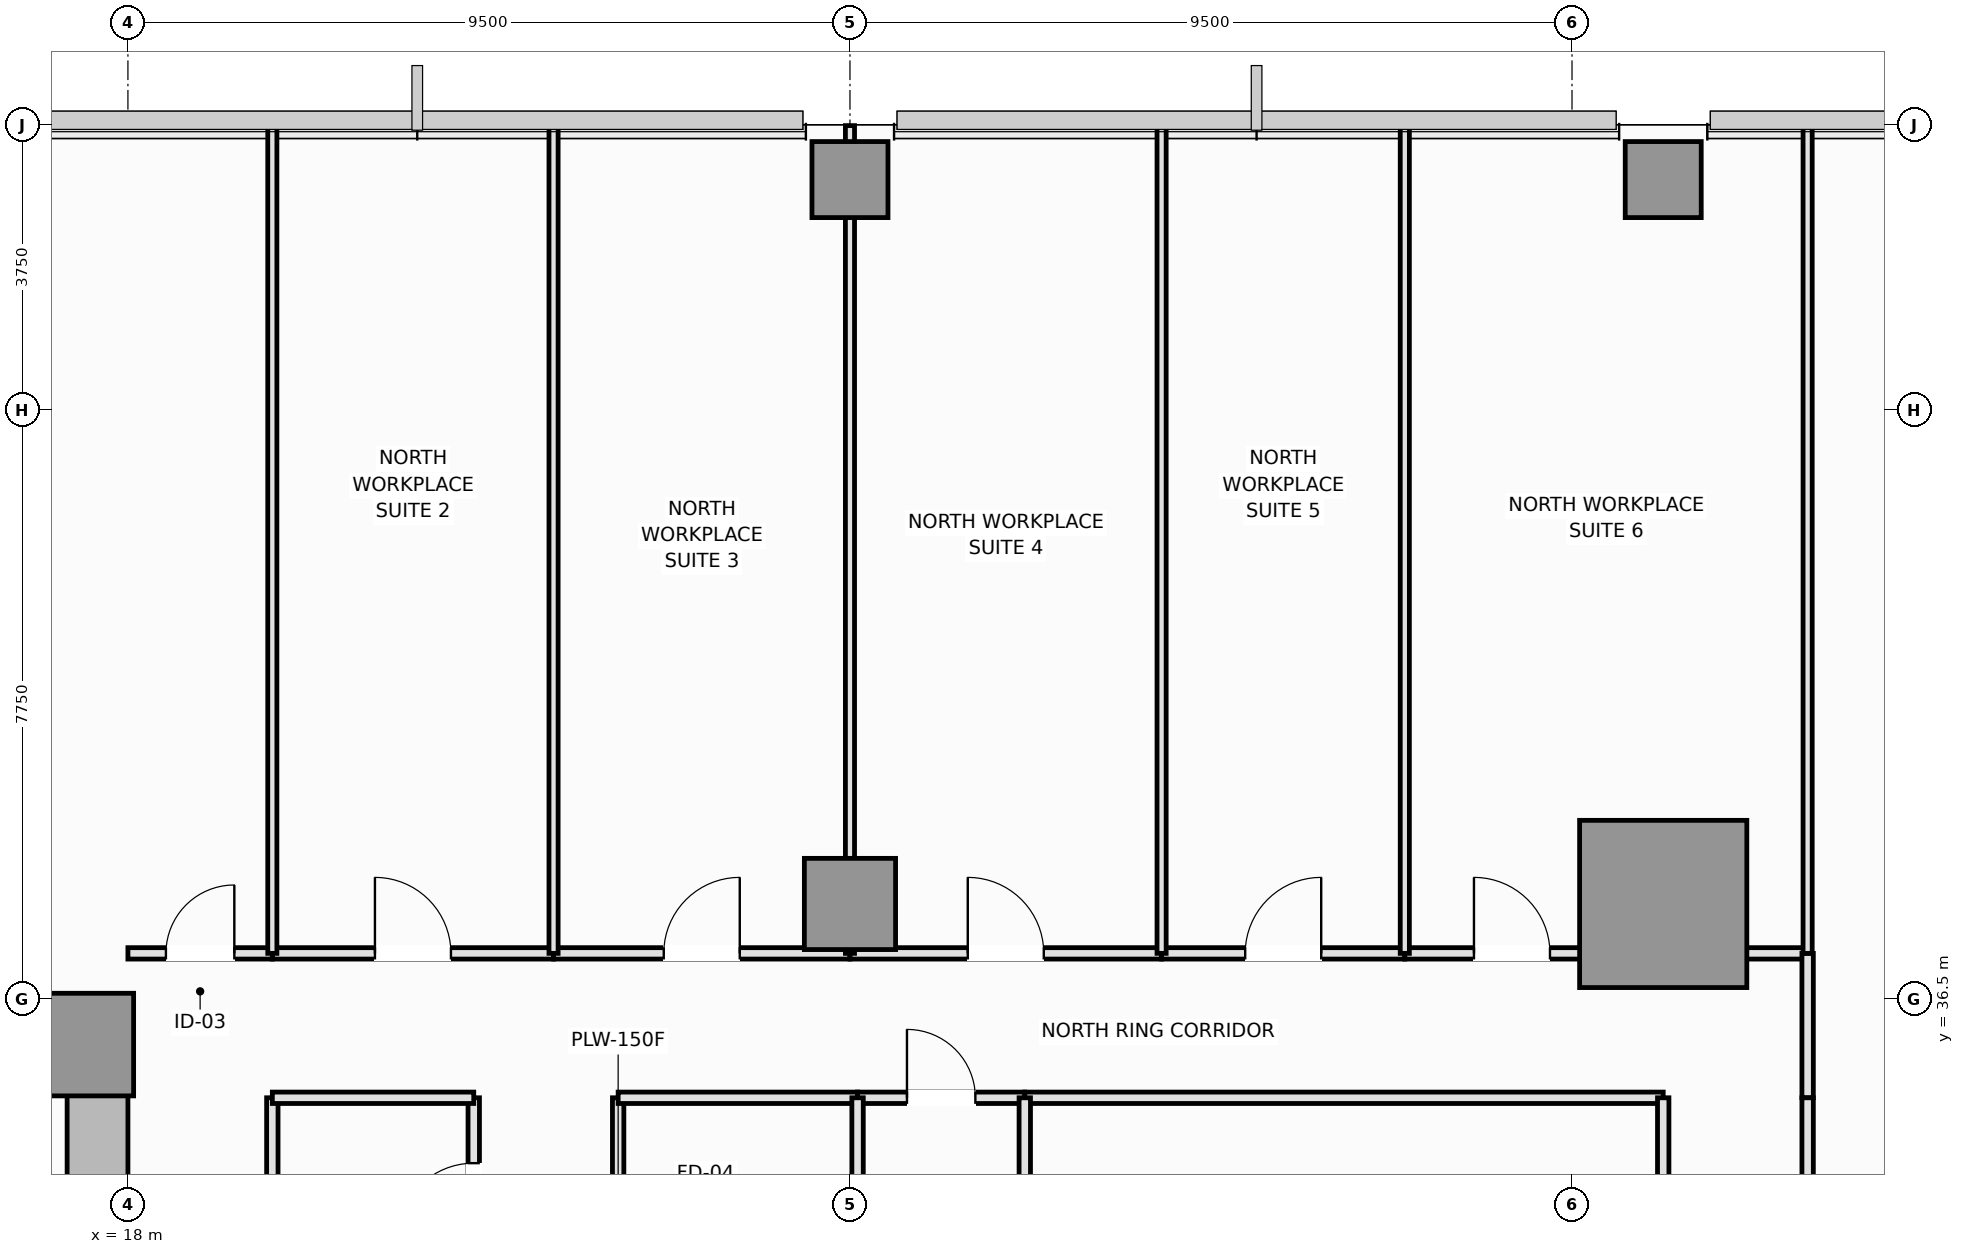
"""IFC4 building model, lengths in metres.
Left out: names, types, materials, properties, quantities, classifications, styles, units other than length and angle.
Written with IfcOpenShell. Run it as: python <this file> out.ifc"""

import sys

from ifc_helpers import new_model, si_unit, direction, frame, frame_2d, origin, origin_2d, place, context, subcontext, project, spatial, rectangle, extrude, element, fill, save


model = new_model("IFC4")
c1 = context("Model", 3, precision=1e-05, world=origin(), true_north=direction((0.0, 1.0)))
c2 = subcontext(c1, "Body", "Model", "MODEL_VIEW")
j1 = project(units=[si_unit("LENGTHUNIT", "METRE"), si_unit("PLANEANGLEUNIT", "RADIAN")], contexts=[c1])
p1 = place(None, origin())
s1 = spatial("IfcSite", under=j1, at=p1, CompositionType="ELEMENT")
p2 = place(p1, origin())
s2 = spatial("IfcBuilding", under=s1, at=p2, CompositionType="ELEMENT")
p3 = place(p2, frame((0.0, 0.0, 46.9)))
s3 = spatial("IfcBuildingStorey", under=s2, at=p3, CompositionType="ELEMENT", Elevation=46.9)
p4 = place(p3, frame((4.5, 36.1, 0.0), z_axis=(0.0, 0.0, 1.0), x_axis=(1.0, 0.0, 0.0)))
e1 = element("IfcWall", 1, at=p4, inside=s3, PredefinedType="SHEAR", context=c2, shape_type="SweptSolid", body=[
    extrude(rectangle(XDim=13.5, YDim=0.8, at=frame_2d((6.75, 0.0))), origin(), (0.0, 0.0, 1.0), 3.55),
])
p5 = place(p3, frame((17.6, 27.05, 0.0), z_axis=(0.0, 0.0, 1.0), x_axis=(0.0, 1.0, 0.0)))
e2 = element("IfcWall", 2, at=p5, inside=s3, PredefinedType="SHEAR", context=c2, shape_type="SweptSolid", body=[
    extrude(rectangle(XDim=8.65, YDim=0.8, at=frame_2d((4.325, 0.0))), origin(), (0.0, 0.0, 1.0), 3.55),
])
p6 = place(p5, frame((3.45, 0.0, 0.0)))
e3 = element("IfcOpeningElement", 3, at=p6, cuts=e2, PredefinedType="OPENING", context=c2, shape_type="SweptSolid", body=[
    extrude(rectangle(XDim=1.1, YDim=2.15, at=frame_2d((0.55, 1.075))), frame((0.0, 0.41, 0.0), z_axis=(0.0, -1.0, 0.0), x_axis=(1.0, 0.0, 0.0)), (0.0, 0.0, 1.0), 0.82),
])
p7 = place(p3, frame((17.4, 35.9, 0.0), z_axis=(0.0, 0.0, 1.0), x_axis=(1.0, 0.0, 0.0)))
e4 = element("IfcColumn", 4, at=p7, inside=s3, PredefinedType="PILASTER", context=c2, shape_type="SweptSolid", body=[
    extrude(rectangle(XDim=1.35, YDim=1.35, at=origin_2d()), origin(), (0.0, 0.0, 1.0), 3.55),
])
p8 = place(p3, frame((38.2, 37.75, 0.0), z_axis=(0.0, 0.0, 1.0), x_axis=(1.0, 0.0, 0.0)))
e5 = element("IfcColumn", 5, at=p8, inside=s3, PredefinedType="COLUMN", context=c2, shape_type="SweptSolid", body=[
    extrude(rectangle(XDim=2.2, YDim=2.2, at=origin_2d()), origin(), (0.0, 0.0, 1.0), 3.55),
])
p9 = place(p3, frame((27.5, 37.75, 0.0), z_axis=(0.0, 0.0, 1.0), x_axis=(1.0, 0.0, 0.0)))
e6 = element("IfcColumn", 6, at=p9, inside=s3, PredefinedType="COLUMN", context=c2, shape_type="SweptSolid", body=[
    extrude(rectangle(XDim=1.2, YDim=1.2, at=origin_2d()), origin(), (0.0, 0.0, 1.0), 3.55),
])
for number, where, z_axis, x_axis in (
    (7, (27.5, 47.28, 0.0), (0.0, 0.0, 1.0), (1.0, 0.0, 0.0)),
    (8, (38.2, 47.28, 0.0), (0.0, 0.0, 1.0), (1.0, 0.0, 0.0)),
):
    element("IfcColumn", number, at=place(p3, frame(where, z_axis=z_axis, x_axis=x_axis)), inside=s3, PredefinedType="COLUMN", context=c2, shape_type="SweptSolid", body=[
        extrude(rectangle(XDim=1.0, YDim=1.0, at=origin_2d()), origin(), (0.0, 0.0, 1.0), 3.55),
    ])
p10 = place(p3, frame((22.55, 32.48, 0.0), z_axis=(0.0, 0.0, 1.0), x_axis=(0.0, 1.0, 0.0)))
e9 = element("IfcWall", 9, at=p10, inside=s3, PredefinedType="PARTITIONING", context=c2, shape_type="SweptSolid", body=[
    extrude(rectangle(XDim=2.72, YDim=0.15, at=frame_2d((1.36, 0.0))), origin(), (0.0, 0.0, 1.0), 3.01),
])
p11 = place(p10, frame((0.86, 0.0, 0.0)))
e10 = element("IfcOpeningElement", 10, at=p11, cuts=e9, PredefinedType="OPENING", context=c2, shape_type="SweptSolid", body=[
    extrude(rectangle(XDim=1.0, YDim=2.15, at=frame_2d((0.5, 1.075))), frame((0.0, 0.085, 0.0), z_axis=(0.0, -1.0, 0.0), x_axis=(1.0, 0.0, 0.0)), (0.0, 0.0, 1.0), 0.17),
])
p12 = place(p3, frame((24.45, 32.1, 0.0), z_axis=(0.0, 0.0, 1.0), x_axis=(0.0, 1.0, 0.0)))
e11 = element("IfcWall", 11, at=p12, inside=s3, PredefinedType="PLUMBINGWALL", context=c2, shape_type="SweptSolid", body=[
    extrude(rectangle(XDim=3.1, YDim=0.15, at=frame_2d((1.55, 0.0))), origin(), (0.0, 0.0, 1.0), 3.37),
])
p13 = place(p12, frame((1.1, 0.0, 0.0)))
e12 = element("IfcOpeningElement", 12, at=p13, cuts=e11, PredefinedType="OPENING", context=c2, shape_type="SweptSolid", body=[
    extrude(rectangle(XDim=0.9, YDim=2.1, at=frame_2d((0.45, 1.05))), frame((0.0, 0.085, 0.0), z_axis=(0.0, -1.0, 0.0), x_axis=(1.0, 0.0, 0.0)), (0.0, 0.0, 1.0), 0.17),
])
p14 = place(p3, frame((19.9, 32.48, 0.0), z_axis=(0.0, 0.0, 1.0), x_axis=(0.0, 1.0, 0.0)))
e13 = element("IfcWall", 13, at=p14, inside=s3, PredefinedType="PARTITIONING", context=c2, shape_type="SweptSolid", body=[
    extrude(rectangle(XDim=2.72, YDim=0.15, at=frame_2d((1.36, 0.0))), origin(), (0.0, 0.0, 1.0), 3.37),
])
p15 = place(p3, frame((19.9, 35.2, 0.0), z_axis=(0.0, 0.0, 1.0), x_axis=(1.0, 0.0, 0.0)))
e14 = element("IfcWall", 14, at=p15, inside=s3, PredefinedType="PARTITIONING", context=c2, shape_type="SweptSolid", body=[
    extrude(rectangle(XDim=2.65, YDim=0.15, at=frame_2d((1.325, 0.0))), origin(), (0.0, 0.0, 1.0), 3.37),
])
p16 = place(p3, frame((24.45, 35.2, 0.0), z_axis=(0.0, 0.0, 1.0), x_axis=(1.0, 0.0, 0.0)))
e15 = element("IfcWall", 15, at=p16, inside=s3, PredefinedType="PLUMBINGWALL", context=c2, shape_type="SweptSolid", body=[
    extrude(rectangle(XDim=3.15, YDim=0.15, at=frame_2d((1.575, 0.0))), origin(), (0.0, 0.0, 1.0), 3.37),
])
p17 = place(p3, frame((27.6, 35.2, 0.0), z_axis=(0.0, 0.0, 1.0), x_axis=(1.0, 0.0, 0.0)))
e16 = element("IfcWall", 16, at=p17, inside=s3, PredefinedType="PLUMBINGWALL", context=c2, shape_type="SweptSolid", body=[
    extrude(rectangle(XDim=2.2, YDim=0.15, at=frame_2d((1.1, 0.0))), origin(), (0.0, 0.0, 1.0), 3.37),
])
p18 = place(p17, frame((0.65, 0.0, 0.0)))
e17 = element("IfcOpeningElement", 17, at=p18, cuts=e16, PredefinedType="OPENING", context=c2, shape_type="SweptSolid", body=[
    extrude(rectangle(XDim=0.9, YDim=2.1, at=frame_2d((0.45, 1.05))), frame((0.0, 0.085, 0.0), z_axis=(0.0, -1.0, 0.0), x_axis=(1.0, 0.0, 0.0)), (0.0, 0.0, 1.0), 0.17),
])
p19 = place(p3, frame((29.8, 35.2, 0.0), z_axis=(0.0, 0.0, 1.0), x_axis=(1.0, 0.0, 0.0)))
e18 = element("IfcWall", 18, at=p19, inside=s3, PredefinedType="PARTITIONING", context=c2, shape_type="SweptSolid", body=[
    extrude(rectangle(XDim=8.4, YDim=0.15, at=frame_2d((4.2, 0.0))), origin(), (0.0, 0.0, 1.0), 3.37),
])
p20 = place(p3, frame((18.0, 37.1, 0.0), z_axis=(0.0, 0.0, 1.0), x_axis=(1.0, 0.0, 0.0)))
e19 = element("IfcWall", 19, at=p20, inside=s3, PredefinedType="PARTITIONING", context=c2, shape_type="SweptSolid", body=[
    extrude(rectangle(XDim=1.9, YDim=0.15, at=frame_2d((0.95, 0.0))), origin(), (0.0, 0.0, 1.0), 3.37),
])
p21 = place(p20, frame((0.5, 0.0, 0.0)))
e20 = element("IfcOpeningElement", 20, at=p21, cuts=e19, PredefinedType="OPENING", context=c2, shape_type="SweptSolid", body=[
    extrude(rectangle(XDim=0.9, YDim=2.1, at=frame_2d((0.45, 1.05))), frame((0.0, 0.085, 0.0), z_axis=(0.0, -1.0, 0.0), x_axis=(1.0, 0.0, 0.0)), (0.0, 0.0, 1.0), 0.17),
])
p22 = place(p3, frame((19.9, 37.1, 0.0), z_axis=(0.0, 0.0, 1.0), x_axis=(1.0, 0.0, 0.0)))
e21 = element("IfcWall", 21, at=p22, inside=s3, PredefinedType="PARTITIONING", context=c2, shape_type="SweptSolid", body=[
    extrude(rectangle(XDim=3.7, YDim=0.15, at=frame_2d((1.85, 0.0))), origin(), (0.0, 0.0, 1.0), 3.37),
])
p23 = place(p22, frame((1.35, 0.0, 0.0)))
e22 = element("IfcOpeningElement", 22, at=p23, cuts=e21, PredefinedType="OPENING", context=c2, shape_type="SweptSolid", body=[
    extrude(rectangle(XDim=1.0, YDim=2.15, at=frame_2d((0.5, 1.075))), frame((0.0, 0.085, 0.0), z_axis=(0.0, -1.0, 0.0), x_axis=(1.0, 0.0, 0.0)), (0.0, 0.0, 1.0), 0.17),
])
p24 = place(p3, frame((23.6, 37.1, 0.0), z_axis=(0.0, 0.0, 1.0), x_axis=(1.0, 0.0, 0.0)))
e23 = element("IfcWall", 23, at=p24, inside=s3, PredefinedType="PARTITIONING", context=c2, shape_type="SweptSolid", body=[
    extrude(rectangle(XDim=3.9, YDim=0.15, at=frame_2d((1.95, 0.0))), origin(), (0.0, 0.0, 1.0), 3.37),
])
p25 = place(p24, frame((1.45, 0.0, 0.0)))
e24 = element("IfcOpeningElement", 24, at=p25, cuts=e23, PredefinedType="OPENING", context=c2, shape_type="SweptSolid", body=[
    extrude(rectangle(XDim=1.0, YDim=2.15, at=frame_2d((0.5, 1.075))), frame((0.0, 0.085, 0.0), z_axis=(0.0, -1.0, 0.0), x_axis=(1.0, 0.0, 0.0)), (0.0, 0.0, 1.0), 0.17),
])
p26 = place(p3, frame((27.5, 37.1, 0.0), z_axis=(0.0, 0.0, 1.0), x_axis=(1.0, 0.0, 0.0)))
e25 = element("IfcWall", 25, at=p26, inside=s3, PredefinedType="PARTITIONING", context=c2, shape_type="SweptSolid", body=[
    extrude(rectangle(XDim=4.1, YDim=0.15, at=frame_2d((2.05, 0.0))), origin(), (0.0, 0.0, 1.0), 3.37),
])
p27 = place(p26, frame((1.55, 0.0, 0.0)))
e26 = element("IfcOpeningElement", 26, at=p27, cuts=e25, PredefinedType="OPENING", context=c2, shape_type="SweptSolid", body=[
    extrude(rectangle(XDim=1.0, YDim=2.15, at=frame_2d((0.5, 1.075))), frame((0.0, 0.085, 0.0), z_axis=(0.0, -1.0, 0.0), x_axis=(1.0, 0.0, 0.0)), (0.0, 0.0, 1.0), 0.17),
])
p28 = place(p3, frame((31.6, 37.1, 0.0), z_axis=(0.0, 0.0, 1.0), x_axis=(1.0, 0.0, 0.0)))
e27 = element("IfcWall", 27, at=p28, inside=s3, PredefinedType="PARTITIONING", context=c2, shape_type="SweptSolid", body=[
    extrude(rectangle(XDim=3.2, YDim=0.15, at=frame_2d((1.6, 0.0))), origin(), (0.0, 0.0, 1.0), 3.37),
])
p29 = place(p28, frame((1.1, 0.0, 0.0)))
e28 = element("IfcOpeningElement", 28, at=p29, cuts=e27, PredefinedType="OPENING", context=c2, shape_type="SweptSolid", body=[
    extrude(rectangle(XDim=1.0, YDim=2.15, at=frame_2d((0.5, 1.075))), frame((0.0, 0.085, 0.0), z_axis=(0.0, -1.0, 0.0), x_axis=(1.0, 0.0, 0.0)), (0.0, 0.0, 1.0), 0.17),
])
p30 = place(p3, frame((34.8, 37.1, 0.0), z_axis=(0.0, 0.0, 1.0), x_axis=(1.0, 0.0, 0.0)))
e29 = element("IfcWall", 29, at=p30, inside=s3, PredefinedType="PARTITIONING", context=c2, shape_type="SweptSolid", body=[
    extrude(rectangle(XDim=5.3, YDim=0.15, at=frame_2d((2.65, 0.0))), origin(), (0.0, 0.0, 1.0), 3.37),
])
p31 = place(p30, frame((0.91, 0.0, 0.0)))
e30 = element("IfcOpeningElement", 30, at=p31, cuts=e29, PredefinedType="OPENING", context=c2, shape_type="SweptSolid", body=[
    extrude(rectangle(XDim=1.0, YDim=2.15, at=frame_2d((0.5, 1.075))), frame((0.0, 0.085, 0.0), z_axis=(0.0, -1.0, 0.0), x_axis=(1.0, 0.0, 0.0)), (0.0, 0.0, 1.0), 0.17),
])
p32 = place(p3, frame((40.1, 35.2, 0.0), z_axis=(0.0, 0.0, 1.0), x_axis=(0.0, 1.0, 0.0)))
e31 = element("IfcWall", 31, at=p32, inside=s3, PredefinedType="PARTITIONING", context=c2, shape_type="SweptSolid", body=[
    extrude(rectangle(XDim=1.9, YDim=0.15, at=frame_2d((0.95, 0.0))), origin(), (0.0, 0.0, 1.0), 3.37),
])
p33 = place(p3, frame((38.2, 32.1, 0.0), z_axis=(0.0, 0.0, 1.0), x_axis=(0.0, 1.0, 0.0)))
e32 = element("IfcWall", 32, at=p33, inside=s3, PredefinedType="PARTITIONING", context=c2, shape_type="SweptSolid", body=[
    extrude(rectangle(XDim=3.1, YDim=0.15, at=frame_2d((1.55, 0.0))), origin(), (0.0, 0.0, 1.0), 2.82),
])
p34 = place(p33, frame((1.05, 0.0, 0.0)))
e33 = element("IfcOpeningElement", 33, at=p34, cuts=e32, PredefinedType="OPENING", context=c2, shape_type="SweptSolid", body=[
    extrude(rectangle(XDim=1.0, YDim=2.15, at=frame_2d((0.5, 1.075))), frame((0.0, 0.085, 0.0), z_axis=(0.0, -1.0, 0.0), x_axis=(1.0, 0.0, 0.0)), (0.0, 0.0, 1.0), 0.17),
])
p35 = place(p3, frame((40.1, 32.0, 0.0), z_axis=(0.0, 0.0, 1.0), x_axis=(0.0, 1.0, 0.0)))
e34 = element("IfcWall", 34, at=p35, inside=s3, PredefinedType="PARTITIONING", context=c2, shape_type="SweptSolid", body=[
    extrude(rectangle(XDim=3.2, YDim=0.15, at=frame_2d((1.6, 0.0))), origin(), (0.0, 0.0, 1.0), 3.37),
])
p36 = place(p35, frame((1.1, 0.0, 0.0)))
e35 = element("IfcOpeningElement", 35, at=p36, cuts=e34, PredefinedType="OPENING", context=c2, shape_type="SweptSolid", body=[
    extrude(rectangle(XDim=1.0, YDim=2.15, at=frame_2d((0.5, 1.075))), frame((0.0, 0.085, 0.0), z_axis=(0.0, -1.0, 0.0), x_axis=(1.0, 0.0, 0.0)), (0.0, 0.0, 1.0), 0.17),
])
for number, where, z_axis, x_axis in (
    (36, (27.6, 32.1, 0.0), (0.0, 0.0, 1.0), (0.0, 1.0, 0.0)),
    (37, (29.8, 32.1, 0.0), (0.0, 0.0, 1.0), (0.0, 1.0, 0.0)),
):
    element("IfcWall", number, at=place(p3, frame(where, z_axis=z_axis, x_axis=x_axis)), inside=s3, PredefinedType="PLUMBINGWALL", context=c2, shape_type="SweptSolid", body=[
        extrude(rectangle(XDim=3.1, YDim=0.15, at=frame_2d((1.55, 0.0))), origin(), (0.0, 0.0, 1.0), 3.37),
    ])
for number, where, z_axis, x_axis in (
    (38, (19.9, 37.1, 0.0), (0.0, 0.0, 1.0), (0.0, 1.0, 0.0)),
    (39, (23.6, 37.1, 0.0), (0.0, 0.0, 1.0), (0.0, 1.0, 0.0)),
):
    element("IfcWall", number, at=place(p3, frame(where, z_axis=z_axis, x_axis=x_axis)), inside=s3, PredefinedType="PARTITIONING", context=c2, shape_type="SweptSolid", body=[
        extrude(rectangle(XDim=10.89, YDim=0.12, at=frame_2d((5.445, 0.0))), origin(), (0.0, 0.0, 1.0), 3.37),
    ])
p37 = place(p3, frame((27.5, 37.1, 0.0), z_axis=(0.0, 0.0, 1.0), x_axis=(0.0, 1.0, 0.0)))
e40 = element("IfcWall", 40, at=p37, inside=s3, PredefinedType="PARTITIONING", context=c2, shape_type="SweptSolid", body=[
    extrude(rectangle(XDim=10.89, YDim=0.12, at=frame_2d((5.445, 0.0))), origin(), (0.0, 0.0, 1.0), 2.82),
])
for number, where, z_axis, x_axis in (
    (41, (31.6, 37.1, 0.0), (0.0, 0.0, 1.0), (0.0, 1.0, 0.0)),
    (42, (34.8, 37.1, 0.0), (0.0, 0.0, 1.0), (0.0, 1.0, 0.0)),
    (43, (40.1, 37.1, 0.0), (0.0, 0.0, 1.0), (0.0, 1.0, 0.0)),
):
    element("IfcWall", number, at=place(p3, frame(where, z_axis=z_axis, x_axis=x_axis)), inside=s3, PredefinedType="PARTITIONING", context=c2, shape_type="SweptSolid", body=[
        extrude(rectangle(XDim=10.89, YDim=0.12, at=frame_2d((5.445, 0.0))), origin(), (0.0, 0.0, 1.0), 3.37),
    ])
p38 = place(p11, origin())
e44 = element("IfcDoor", 44, at=p38, inside=s3, OperationType="SINGLE_SWING_LEFT", PredefinedType="DOOR", context=c2, shape_type="SweptSolid", body=[
    extrude(rectangle(XDim=1.0, YDim=2.15, at=frame_2d((0.5, 1.075))), frame((0.0, 0.025, 0.0), z_axis=(0.0, -1.0, 0.0), x_axis=(1.0, 0.0, 0.0)), (0.0, 0.0, 1.0), 0.05),
])
fill(e10, e44)
p39 = place(p18, origin())
e45 = element("IfcDoor", 45, at=p39, inside=s3, OperationType="SINGLE_SWING_LEFT", PredefinedType="DOOR", context=c2, shape_type="SweptSolid", body=[
    extrude(rectangle(XDim=0.9, YDim=2.1, at=frame_2d((0.45, 1.05))), frame((0.0, 0.025, 0.0), z_axis=(0.0, -1.0, 0.0), x_axis=(1.0, 0.0, 0.0)), (0.0, 0.0, 1.0), 0.05),
])
fill(e17, e45)
p40 = place(p21, origin())
e46 = element("IfcDoor", 46, at=p40, inside=s3, OperationType="SINGLE_SWING_RIGHT", PredefinedType="DOOR", context=c2, shape_type="SweptSolid", body=[
    extrude(rectangle(XDim=0.9, YDim=2.1, at=frame_2d((0.45, 1.05))), frame((0.0, 0.025, 0.0), z_axis=(0.0, -1.0, 0.0), x_axis=(1.0, 0.0, 0.0)), (0.0, 0.0, 1.0), 0.05),
])
fill(e20, e46)
p41 = place(p23, origin())
e47 = element("IfcDoor", 47, at=p41, inside=s3, OperationType="SINGLE_SWING_LEFT", PredefinedType="DOOR", context=c2, shape_type="SweptSolid", body=[
    extrude(rectangle(XDim=1.0, YDim=2.15, at=frame_2d((0.5, 1.075))), frame((0.0, 0.025, 0.0), z_axis=(0.0, -1.0, 0.0), x_axis=(1.0, 0.0, 0.0)), (0.0, 0.0, 1.0), 0.05),
])
fill(e22, e47)
p42 = place(p25, origin())
e48 = element("IfcDoor", 48, at=p42, inside=s3, OperationType="SINGLE_SWING_RIGHT", PredefinedType="DOOR", context=c2, shape_type="SweptSolid", body=[
    extrude(rectangle(XDim=1.0, YDim=2.15, at=frame_2d((0.5, 1.075))), frame((0.0, 0.025, 0.0), z_axis=(0.0, -1.0, 0.0), x_axis=(1.0, 0.0, 0.0)), (0.0, 0.0, 1.0), 0.05),
])
fill(e24, e48)
p43 = place(p27, origin())
e49 = element("IfcDoor", 49, at=p43, inside=s3, OperationType="SINGLE_SWING_LEFT", PredefinedType="DOOR", context=c2, shape_type="SweptSolid", body=[
    extrude(rectangle(XDim=1.0, YDim=2.15, at=frame_2d((0.5, 1.075))), frame((0.0, 0.025, 0.0), z_axis=(0.0, -1.0, 0.0), x_axis=(1.0, 0.0, 0.0)), (0.0, 0.0, 1.0), 0.05),
])
fill(e26, e49)
p44 = place(p29, origin())
e50 = element("IfcDoor", 50, at=p44, inside=s3, OperationType="SINGLE_SWING_RIGHT", PredefinedType="DOOR", context=c2, shape_type="SweptSolid", body=[
    extrude(rectangle(XDim=1.0, YDim=2.15, at=frame_2d((0.5, 1.075))), frame((0.0, 0.025, 0.0), z_axis=(0.0, -1.0, 0.0), x_axis=(1.0, 0.0, 0.0)), (0.0, 0.0, 1.0), 0.05),
])
fill(e28, e50)
p45 = place(p31, origin())
e51 = element("IfcDoor", 51, at=p45, inside=s3, OperationType="SINGLE_SWING_LEFT", PredefinedType="DOOR", context=c2, shape_type="SweptSolid", body=[
    extrude(rectangle(XDim=1.0, YDim=2.15, at=frame_2d((0.5, 1.075))), frame((0.0, 0.025, 0.0), z_axis=(0.0, -1.0, 0.0), x_axis=(1.0, 0.0, 0.0)), (0.0, 0.0, 1.0), 0.05),
])
fill(e30, e51)
save(model, sys.argv[1])
